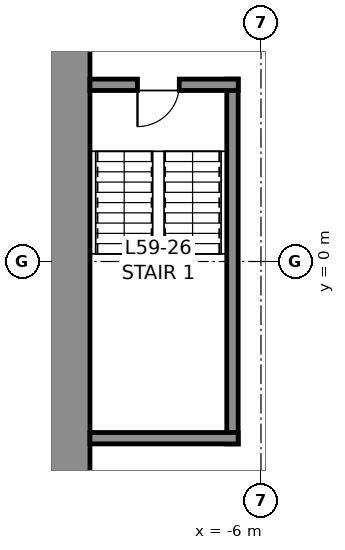
"""IFC4 building model, lengths in metres.
Left out: names, types, materials, properties, quantities, classifications, styles, units other than length and angle.
Written with IfcOpenShell. Run it as: python <this file> out.ifc"""

import sys

from ifc_helpers import new_model, si_unit, direction, frame, frame_2d, origin, place, context, subcontext, project, spatial, rectangle, extrude, element, fill, save


model = new_model("IFC4")
c1 = context("Model", 3, precision=1e-05, world=origin(), true_north=direction((0.0, 1.0)))
c2 = subcontext(c1, "Body", "Model", "MODEL_VIEW")
j1 = project(units=[si_unit("LENGTHUNIT", "METRE"), si_unit("PLANEANGLEUNIT", "RADIAN")], contexts=[c1])
p1 = place(None, origin())
s1 = spatial("IfcSite", under=j1, at=p1, CompositionType="ELEMENT")
p2 = place(p1, origin())
s2 = spatial("IfcBuilding", under=s1, at=p2, CompositionType="ELEMENT")
p3 = place(p2, frame((0.0, 0.0, 265.8)))
s3 = spatial("IfcBuildingStorey", under=s2, at=p3, CompositionType="ELEMENT", Elevation=265.8)
p4 = place(p3, frame((-11.25, -10.5, 0.0), z_axis=(0.0, 0.0, 1.0), x_axis=(0.0, 1.0, 0.0)))
e1 = element("IfcWall", 1, at=p4, inside=s3, PredefinedType="SHEAR", context=c2, shape_type="SweptSolid", body=[
    extrude(rectangle(XDim=21.0, YDim=1.5, at=frame_2d((10.5, 0.0))), origin(), (0.0, 0.0, 1.0), 4.0),
])
p5 = place(p4, frame((16.1, 0.0, 0.0)))
e2 = element("IfcOpeningElement", 2, at=p5, cuts=e1, PredefinedType="OPENING", context=c2, shape_type="SweptSolid", body=[
    extrude(rectangle(XDim=1.2, YDim=2.3, at=frame_2d((0.6, 1.15))), frame((0.0, 0.76, 0.0), z_axis=(0.0, -1.0, 0.0), x_axis=(1.0, 0.0, 0.0)), (0.0, 0.0, 1.0), 1.52),
])
p6 = place(p4, frame((3.7, 0.0, 0.0)))
e3 = element("IfcOpeningElement", 3, at=p6, cuts=e1, PredefinedType="OPENING", context=c2, shape_type="SweptSolid", body=[
    extrude(rectangle(XDim=1.2, YDim=2.3, at=frame_2d((0.6, 1.15))), frame((0.0, 0.76, 0.0), z_axis=(0.0, -1.0, 0.0), x_axis=(1.0, 0.0, 0.0)), (0.0, 0.0, 1.0), 1.52),
])
p7 = place(p3, frame((-6.75, -4.8, 0.0), z_axis=(0.0, 0.0, 1.0), x_axis=(0.0, 1.0, 0.0)))
e4 = element("IfcWall", 4, at=p7, inside=s3, PredefinedType="SOLIDWALL", context=c2, shape_type="SweptSolid", body=[
    extrude(rectangle(XDim=9.6, YDim=0.3, at=frame_2d((4.8, 0.0))), origin(), (0.0, 0.0, 1.0), 3.75),
])
p8 = place(p3, frame((-10.5, 4.65, 0.0), z_axis=(0.0, 0.0, 1.0), x_axis=(1.0, 0.0, 0.0)))
e5 = element("IfcWall", 5, at=p8, inside=s3, PredefinedType="SOLIDWALL", context=c2, shape_type="SweptSolid", body=[
    extrude(rectangle(XDim=3.9, YDim=0.3, at=frame_2d((1.95, 0.0))), origin(), (0.0, 0.0, 1.0), 3.75),
])
p9 = place(p8, frame((1.25, 0.0, 0.0)))
e6 = element("IfcOpeningElement", 6, at=p9, cuts=e5, PredefinedType="OPENING", context=c2, shape_type="SweptSolid", body=[
    extrude(rectangle(XDim=1.1, YDim=2.3, at=frame_2d((0.55, 1.15))), frame((0.0, 0.16, 0.0), z_axis=(0.0, -1.0, 0.0), x_axis=(1.0, 0.0, 0.0)), (0.0, 0.0, 1.0), 0.32),
])
p10 = place(p3, frame((-6.6, -4.65, 0.0), z_axis=(0.0, 0.0, 1.0), x_axis=(-1.0, 0.0, 0.0)))
e7 = element("IfcWall", 7, at=p10, inside=s3, PredefinedType="SOLIDWALL", context=c2, shape_type="SweptSolid", body=[
    extrude(rectangle(XDim=3.9, YDim=0.3, at=frame_2d((1.95, 0.0))), origin(), (0.0, 0.0, 1.0), 3.75),
])
p11 = place(p9, frame((1.1, 0.0, 0.0), z_axis=(0.0, 0.0, 1.0), x_axis=(-1.0, 0.0, 0.0)))
e8 = element("IfcDoor", 8, at=p11, inside=s3, OperationType="SINGLE_SWING_RIGHT", PredefinedType="DOOR", context=c2, shape_type="SweptSolid", body=[
    extrude(rectangle(XDim=1.1, YDim=2.3, at=frame_2d((0.55, 1.15))), frame((0.0, 0.025, 0.0), z_axis=(0.0, -1.0, 0.0), x_axis=(1.0, 0.0, 0.0)), (0.0, 0.0, 1.0), 0.05),
])
fill(e6, e8)
save(model, sys.argv[1])
